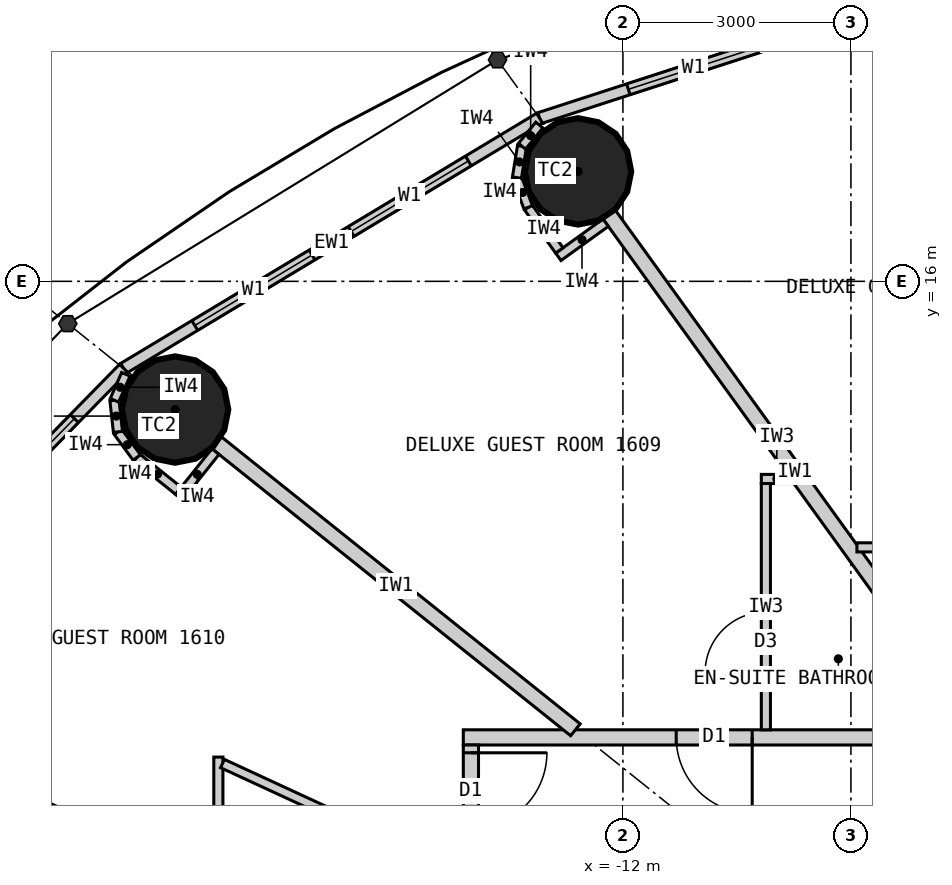
"""IFC4 building model, lengths in metres.
Left out: names, types, materials, properties, quantities, classifications, styles, units other than length and angle.
Written with IfcOpenShell. Run it as: python <this file> out.ifc"""

import sys

from ifc_helpers import new_model, si_unit, direction, frame, frame_2d, origin, origin_2d, place, context, subcontext, project, spatial, rectangle, circle, extrude, element, fill, save


model = new_model("IFC4")
c1 = context("Model", 3, precision=1e-05, world=origin(), true_north=direction((0.0, 1.0)))
c2 = subcontext(c1, "Body", "Model", "MODEL_VIEW")
j1 = project(units=[si_unit("LENGTHUNIT", "METRE"), si_unit("PLANEANGLEUNIT", "RADIAN")], contexts=[c1])
p1 = place(None, origin())
s1 = spatial("IfcSite", under=j1, at=p1, CompositionType="ELEMENT")
p2 = place(p1, origin())
s2 = spatial("IfcBuilding", under=s1, at=p2, CompositionType="ELEMENT")
p3 = place(p2, frame((0.0, 0.0, 67.2)))
s3 = spatial("IfcBuildingStorey", under=s2, at=p3, CompositionType="ELEMENT", Elevation=67.2)
for number, where, z_axis, x_axis in (
    (1, (-12.591, 17.447, 0.0), (0.0, 0.0, 1.0), (1.0, 0.0, 0.0)),
    (2, (-17.892, 14.313, 0.0), (0.0, 0.0, 1.0), (1.0, 0.0, 0.0)),
):
    element("IfcColumn", number, at=place(p3, frame(where, z_axis=z_axis, x_axis=x_axis)), inside=s3, PredefinedType="COLUMN", context=c2, shape_type="SweptSolid", body=[
        extrude(circle(Radius=0.7, at=origin_2d()), origin(), (0.0, 0.0, 1.0), 3.3),
    ])
p4 = place(p3, frame((-6.766, 20.202, 0.0), z_axis=(0.0, 0.0, 1.0), x_axis=(-0.951137534625, -0.308767534285, 0.0)))
e3 = element("IfcWall", 3, at=p4, inside=s3, PredefinedType="ELEMENTEDWALL", context=c2, shape_type="SweptSolid", body=[
    extrude(rectangle(XDim=6.655, YDim=0.15, at=frame_2d((3.328, 0.0))), origin(), (0.0, 0.0, 1.0), 3.12),
])
p5 = place(p4, frame((1.228, 0.0, 0.9)))
e4 = element("IfcOpeningElement", 4, at=p5, cuts=e3, PredefinedType="OPENING", context=c2, shape_type="SweptSolid", body=[
    extrude(rectangle(XDim=1.8, YDim=1.9, at=frame_2d((0.9, 0.95))), frame((0.0, 0.085, 0.0), z_axis=(0.0, -1.0, 0.0), x_axis=(1.0, 0.0, 0.0)), (0.0, 0.0, 1.0), 0.17),
])
p6 = place(p4, frame((3.628, 0.0, 0.9)))
e5 = element("IfcOpeningElement", 5, at=p6, cuts=e3, PredefinedType="OPENING", context=c2, shape_type="SweptSolid", body=[
    extrude(rectangle(XDim=1.8, YDim=1.9, at=frame_2d((0.9, 0.95))), frame((0.0, 0.085, 0.0), z_axis=(0.0, -1.0, 0.0), x_axis=(1.0, 0.0, 0.0)), (0.0, 0.0, 1.0), 0.17),
])
p7 = place(p3, frame((-13.096, 18.147, 0.0), z_axis=(0.0, 0.0, 1.0), x_axis=(-0.856983180864, -0.515344377787, 0.0)))
e6 = element("IfcWall", 6, at=p7, inside=s3, PredefinedType="ELEMENTEDWALL", context=c2, shape_type="SweptSolid", body=[
    extrude(rectangle(XDim=6.386, YDim=0.15, at=frame_2d((3.193, 0.0))), origin(), (0.0, 0.0, 1.0), 3.12),
])
p8 = place(p7, frame((1.093, 0.0, 0.9)))
e7 = element("IfcOpeningElement", 7, at=p8, cuts=e6, PredefinedType="OPENING", context=c2, shape_type="SweptSolid", body=[
    extrude(rectangle(XDim=1.8, YDim=1.9, at=frame_2d((0.9, 0.95))), frame((0.0, 0.085, 0.0), z_axis=(0.0, -1.0, 0.0), x_axis=(1.0, 0.0, 0.0)), (0.0, 0.0, 1.0), 0.17),
])
p9 = place(p7, frame((3.493, 0.0, 0.9)))
e8 = element("IfcOpeningElement", 8, at=p9, cuts=e6, PredefinedType="OPENING", context=c2, shape_type="SweptSolid", body=[
    extrude(rectangle(XDim=1.8, YDim=1.9, at=frame_2d((0.9, 0.95))), frame((0.0, 0.085, 0.0), z_axis=(0.0, -1.0, 0.0), x_axis=(1.0, 0.0, 0.0)), (0.0, 0.0, 1.0), 0.17),
])
p10 = place(p3, frame((-18.57, 14.856, 0.0), z_axis=(0.0, 0.0, 1.0), x_axis=(-0.699602905915, -0.714531856557, 0.0)))
e9 = element("IfcWall", 9, at=p10, inside=s3, PredefinedType="ELEMENTEDWALL", context=c2, shape_type="SweptSolid", body=[
    extrude(rectangle(XDim=6.051, YDim=0.15, at=frame_2d((3.025, 0.0))), origin(), (0.0, 0.0, 1.0), 3.12),
])
p11 = place(p10, frame((0.926, 0.0, 0.9)))
e10 = element("IfcOpeningElement", 10, at=p11, cuts=e9, PredefinedType="OPENING", context=c2, shape_type="SweptSolid", body=[
    extrude(rectangle(XDim=1.8, YDim=1.9, at=frame_2d((0.9, 0.95))), frame((0.0, 0.085, 0.0), z_axis=(0.0, -1.0, 0.0), x_axis=(1.0, 0.0, 0.0)), (0.0, 0.0, 1.0), 0.17),
])
p12 = place(p10, frame((3.325, 0.0, 0.9)))
e11 = element("IfcOpeningElement", 11, at=p12, cuts=e9, PredefinedType="OPENING", context=c2, shape_type="SweptSolid", body=[
    extrude(rectangle(XDim=1.8, YDim=1.9, at=frame_2d((0.9, 0.95))), frame((0.0, 0.085, 0.0), z_axis=(0.0, -1.0, 0.0), x_axis=(1.0, 0.0, 0.0)), (0.0, 0.0, 1.0), 0.17),
])
p13 = place(p3, frame((-14.1, 10.0, 0.0), z_axis=(0.0, 0.0, 1.0), x_axis=(1.0, 0.0, 0.0)))
e12 = element("IfcWall", 12, at=p13, inside=s3, PredefinedType="PARTITIONING", context=c2, shape_type="SweptSolid", body=[
    extrude(rectangle(XDim=28.2, YDim=0.2, at=frame_2d((14.1, 0.0))), origin(), (0.0, 0.0, 1.0), 3.12),
])
p14 = place(p13, frame((18.529, 0.0, 0.0)))
e13 = element("IfcOpeningElement", 13, at=p14, cuts=e12, PredefinedType="OPENING", context=c2, shape_type="SweptSolid", body=[
    extrude(rectangle(XDim=1.0, YDim=2.2, at=frame_2d((0.5, 1.1))), frame((0.0, 0.11, 0.0), z_axis=(0.0, -1.0, 0.0), x_axis=(1.0, 0.0, 0.0)), (0.0, 0.0, 1.0), 0.22),
])
p15 = place(p13, frame((14.623, 0.0, 0.0)))
e14 = element("IfcOpeningElement", 14, at=p15, cuts=e12, PredefinedType="OPENING", context=c2, shape_type="SweptSolid", body=[
    extrude(rectangle(XDim=1.0, YDim=2.2, at=frame_2d((0.5, 1.1))), frame((0.0, 0.11, 0.0), z_axis=(0.0, -1.0, 0.0), x_axis=(1.0, 0.0, 0.0)), (0.0, 0.0, 1.0), 0.22),
])
p16 = place(p13, frame((11.24, 0.0, 0.0)))
e15 = element("IfcOpeningElement", 15, at=p16, cuts=e12, PredefinedType="OPENING", context=c2, shape_type="SweptSolid", body=[
    extrude(rectangle(XDim=1.0, YDim=2.2, at=frame_2d((0.5, 1.1))), frame((0.0, 0.11, 0.0), z_axis=(0.0, -1.0, 0.0), x_axis=(1.0, 0.0, 0.0)), (0.0, 0.0, 1.0), 0.22),
])
p17 = place(p13, frame((8.671, 0.0, 0.0)))
e16 = element("IfcOpeningElement", 16, at=p17, cuts=e12, PredefinedType="OPENING", context=c2, shape_type="SweptSolid", body=[
    extrude(rectangle(XDim=1.0, YDim=2.2, at=frame_2d((0.5, 1.1))), frame((0.0, 0.11, 0.0), z_axis=(0.0, -1.0, 0.0), x_axis=(1.0, 0.0, 0.0)), (0.0, 0.0, 1.0), 0.22),
])
p18 = place(p13, frame((2.801, 0.0, 0.0)))
e17 = element("IfcOpeningElement", 17, at=p18, cuts=e12, PredefinedType="OPENING", context=c2, shape_type="SweptSolid", body=[
    extrude(rectangle(XDim=1.0, YDim=2.2, at=frame_2d((0.5, 1.1))), frame((0.0, 0.11, 0.0), z_axis=(0.0, -1.0, 0.0), x_axis=(1.0, 0.0, 0.0)), (0.0, 0.0, 1.0), 0.22),
])
p19 = place(p3, frame((-14.0, 9.9, 0.0), z_axis=(0.0, 0.0, 1.0), x_axis=(0.0, -1.0, 0.0)))
e18 = element("IfcWall", 18, at=p19, inside=s3, PredefinedType="PARTITIONING", context=c2, shape_type="SweptSolid", body=[
    extrude(rectangle(XDim=19.8, YDim=0.2, at=frame_2d((9.9, 0.0))), origin(), (0.0, 0.0, 1.0), 3.12),
])
p20 = place(p19, frame((0.103, 0.0, 0.0)))
e19 = element("IfcOpeningElement", 19, at=p20, cuts=e18, PredefinedType="OPENING", context=c2, shape_type="SweptSolid", body=[
    extrude(rectangle(XDim=1.0, YDim=2.2, at=frame_2d((0.5, 1.1))), frame((0.0, 0.11, 0.0), z_axis=(0.0, -1.0, 0.0), x_axis=(1.0, 0.0, 0.0)), (0.0, 0.0, 1.0), 0.22),
])
p21 = place(p19, frame((5.248, 0.0, 0.0)))
e20 = element("IfcOpeningElement", 20, at=p21, cuts=e18, PredefinedType="OPENING", context=c2, shape_type="SweptSolid", body=[
    extrude(rectangle(XDim=1.0, YDim=2.2, at=frame_2d((0.5, 1.1))), frame((0.0, 0.11, 0.0), z_axis=(0.0, -1.0, 0.0), x_axis=(1.0, 0.0, 0.0)), (0.0, 0.0, 1.0), 0.22),
])
p22 = place(p19, frame((9.438, 0.0, 0.0)))
e21 = element("IfcOpeningElement", 21, at=p22, cuts=e18, PredefinedType="OPENING", context=c2, shape_type="SweptSolid", body=[
    extrude(rectangle(XDim=1.0, YDim=2.2, at=frame_2d((0.5, 1.1))), frame((0.0, 0.11, 0.0), z_axis=(0.0, -1.0, 0.0), x_axis=(1.0, 0.0, 0.0)), (0.0, 0.0, 1.0), 0.22),
])
p23 = place(p19, frame((13.942, 0.0, 0.0)))
e22 = element("IfcOpeningElement", 22, at=p23, cuts=e18, PredefinedType="OPENING", context=c2, shape_type="SweptSolid", body=[
    extrude(rectangle(XDim=1.0, YDim=2.2, at=frame_2d((0.5, 1.1))), frame((0.0, 0.11, 0.0), z_axis=(0.0, -1.0, 0.0), x_axis=(1.0, 0.0, 0.0)), (0.0, 0.0, 1.0), 0.22),
])
p24 = place(p19, frame((18.698, 0.0, 0.0)))
e23 = element("IfcOpeningElement", 23, at=p24, cuts=e18, PredefinedType="OPENING", context=c2, shape_type="SweptSolid", body=[
    extrude(rectangle(XDim=1.0, YDim=2.2, at=frame_2d((0.5, 1.1))), frame((0.0, 0.11, 0.0), z_axis=(0.0, -1.0, 0.0), x_axis=(1.0, 0.0, 0.0)), (0.0, 0.0, 1.0), 0.22),
])
p25 = place(p3, frame((-7.289, 10.1, 0.0), z_axis=(0.0, 0.0, 1.0), x_axis=(-0.585198353053, 0.810890182197, 0.0)))
e24 = element("IfcWall", 24, at=p25, inside=s3, PredefinedType="PARTITIONING", context=c2, shape_type="SweptSolid", body=[
    extrude(rectangle(XDim=8.36, YDim=0.2, at=frame_2d((4.18, 0.0))), origin(), (0.0, 0.0, 1.0), 2.32),
])
p26 = place(p3, frame((-12.625, 10.1, 0.0), z_axis=(0.0, 0.0, 1.0), x_axis=(-0.780892451574, 0.624665493744, 0.0)))
e25 = element("IfcWall", 25, at=p26, inside=s3, PredefinedType="PARTITIONING", context=c2, shape_type="SweptSolid", body=[
    extrude(rectangle(XDim=6.045, YDim=0.2, at=frame_2d((3.022, 0.0))), origin(), (0.0, 0.0, 1.0), 2.32),
])
p27 = place(p3, frame((-14.1, 6.512, 0.0), z_axis=(0.0, 0.0, 1.0), x_axis=(-0.907832871056, 0.419332181247, 0.0)))
e26 = element("IfcWall", 26, at=p27, inside=s3, PredefinedType="PARTITIONING", context=c2, shape_type="SweptSolid", body=[
    extrude(rectangle(XDim=8.023, YDim=0.2, at=frame_2d((4.011, 0.0))), origin(), (0.0, 0.0, 1.0), 2.32),
])
p28 = place(p3, frame((-8.921, 12.5, 0.0), z_axis=(0.0, 0.0, 1.0), x_axis=(1.0, 0.0, 0.0)))
e27 = element("IfcWall", 27, at=p28, inside=s3, PredefinedType="PARTITIONING", context=c2, shape_type="SweptSolid", body=[
    extrude(rectangle(XDim=3.372, YDim=0.12, at=frame_2d((1.686, 0.0))), origin(), (0.0, 0.0, 1.0), 3.12),
])
p29 = place(p3, frame((-9.771, 13.4, 0.0), z_axis=(0.0, 0.0, 1.0), x_axis=(-1.0, 0.0, 0.0)))
e28 = element("IfcWall", 28, at=p29, inside=s3, PredefinedType="PARTITIONING", context=c2, shape_type="SweptSolid", body=[
    extrude(rectangle(XDim=0.408, YDim=0.12, at=frame_2d((0.204, 0.0))), origin(), (0.0, 0.0, 1.0), 3.12),
])
p30 = place(p3, frame((-10.119, 10.1, 0.0), z_axis=(0.0, 0.0, 1.0), x_axis=(0.0, 1.0, 0.0)))
e29 = element("IfcWall", 29, at=p30, inside=s3, PredefinedType="PARTITIONING", context=c2, shape_type="SweptSolid", body=[
    extrude(rectangle(XDim=3.24, YDim=0.12, at=frame_2d((1.62, 0.0))), origin(), (0.0, 0.0, 1.0), 3.12),
])
p31 = place(p30, frame((0.75, 0.0, 0.0)))
e30 = element("IfcOpeningElement", 30, at=p31, cuts=e29, PredefinedType="OPENING", context=c2, shape_type="SweptSolid", body=[
    extrude(rectangle(XDim=0.8, YDim=2.1, at=frame_2d((0.4, 1.05))), frame((0.0, 0.07, 0.0), z_axis=(0.0, -1.0, 0.0), x_axis=(1.0, 0.0, 0.0)), (0.0, 0.0, 1.0), 0.14),
])
p32 = place(p3, frame((-17.323, 8.101, 0.0), z_axis=(0.0, 0.0, 1.0), x_axis=(0.0, 1.0, 0.0)))
e31 = element("IfcWall", 31, at=p32, inside=s3, PredefinedType="PARTITIONING", context=c2, shape_type="SweptSolid", body=[
    extrude(rectangle(XDim=1.64, YDim=0.12, at=frame_2d((0.82, 0.0))), origin(), (0.0, 0.0, 1.0), 3.12),
])
p33 = place(p3, frame((-14.1, 8.193, 0.0), z_axis=(0.0, 0.0, 1.0), x_axis=(-0.907836493557, 0.419324338628, 0.0)))
e32 = element("IfcWall", 32, at=p33, inside=s3, PredefinedType="PARTITIONING", context=c2, shape_type="SweptSolid", body=[
    extrude(rectangle(XDim=3.49, YDim=0.12, at=frame_2d((1.745, 0.0))), origin(), (0.0, 0.0, 1.0), 3.12),
])
p34 = place(p33, frame((0.75, 0.0, 0.0)))
e33 = element("IfcOpeningElement", 33, at=p34, cuts=e32, PredefinedType="OPENING", context=c2, shape_type="SweptSolid", body=[
    extrude(rectangle(XDim=0.8, YDim=2.1, at=frame_2d((0.4, 1.05))), frame((0.0, 0.07, 0.0), z_axis=(0.0, -1.0, 0.0), x_axis=(1.0, 0.0, 0.0)), (0.0, 0.0, 1.0), 0.14),
])
p35 = place(p3, frame((-12.227, 16.772, 0.0), z_axis=(0.0, 0.0, 1.0), x_axis=(-0.810821798253, -0.585293098778, 0.0)))
e34 = element("IfcWall", 34, at=p35, inside=s3, PredefinedType="PARTITIONING", context=c2, shape_type="SweptSolid", body=[
    extrude(rectangle(XDim=0.768, YDim=0.12, at=frame_2d((0.384, 0.0))), origin(), (0.0, 0.0, 1.0), 3.12),
])
p36 = place(p3, frame((-12.836, 16.406, 0.0), z_axis=(0.0, 0.0, 1.0), x_axis=(-0.585223113993, 0.810872312296, 0.0)))
e35 = element("IfcWall", 35, at=p36, inside=s3, PredefinedType="PARTITIONING", context=c2, shape_type="SweptSolid", body=[
    extrude(rectangle(XDim=0.7, YDim=0.12, at=frame_2d((0.35, 0.0))), origin(), (0.0, 0.0, 1.0), 3.12),
])
p37 = place(p3, frame((-13.246, 16.974, 0.0), z_axis=(0.0, 0.0, 1.0), x_axis=(-0.355728122235, 0.934589483705, 0.0)))
e36 = element("IfcWall", 36, at=p37, inside=s3, PredefinedType="PARTITIONING", context=c2, shape_type="SweptSolid", body=[
    extrude(rectangle(XDim=0.418, YDim=0.12, at=frame_2d((0.209, 0.0))), origin(), (0.0, 0.0, 1.0), 3.12),
])
p38 = place(p3, frame((-13.394, 17.365, 0.0), z_axis=(0.0, 0.0, 1.0), x_axis=(0.159379276926, 0.987217425943, 0.0)))
e37 = element("IfcWall", 37, at=p38, inside=s3, PredefinedType="PARTITIONING", context=c2, shape_type="SweptSolid", body=[
    extrude(rectangle(XDim=0.418, YDim=0.12, at=frame_2d((0.209, 0.0))), origin(), (0.0, 0.0, 1.0), 3.12),
])
p39 = place(p3, frame((-13.328, 17.777, 0.0), z_axis=(0.0, 0.0, 1.0), x_axis=(0.632276783541, 0.774742582407, 0.0)))
e38 = element("IfcWall", 38, at=p39, inside=s3, PredefinedType="PARTITIONING", context=c2, shape_type="SweptSolid", body=[
    extrude(rectangle(XDim=0.36, YDim=0.12, at=frame_2d((0.18, 0.0))), origin(), (0.0, 0.0, 1.0), 3.12),
])
p40 = place(p3, frame((-17.361, 13.76, 0.0), z_axis=(0.0, 0.0, 1.0), x_axis=(-0.624501042889, -0.781023973659, 0.0)))
e39 = element("IfcWall", 39, at=p40, inside=s3, PredefinedType="PARTITIONING", context=c2, shape_type="SweptSolid", body=[
    extrude(rectangle(XDim=0.767, YDim=0.12, at=frame_2d((0.384, 0.0))), origin(), (0.0, 0.0, 1.0), 3.12),
])
p41 = place(p3, frame((-17.85, 13.246, 0.0), z_axis=(0.0, 0.0, 1.0), x_axis=(-0.780902834923, 0.62465251333, 0.0)))
e40 = element("IfcWall", 40, at=p41, inside=s3, PredefinedType="PARTITIONING", context=c2, shape_type="SweptSolid", body=[
    extrude(rectangle(XDim=0.7, YDim=0.12, at=frame_2d((0.35, 0.0))), origin(), (0.0, 0.0, 1.0), 3.12),
])
for number, where, z_axis, x_axis in (
    (41, (-18.396, 13.683, 0.0), (0.0, 0.0, 1.0), (-0.592, 0.806, 0.0)),
    (42, (-18.644, 14.02, 0.0), (0.0, 0.0, 1.0), (-0.11, 0.994, 0.0)),
):
    element("IfcWall", number, at=place(p3, frame(where, z_axis=z_axis, x_axis=x_axis)), inside=s3, PredefinedType="PARTITIONING", context=c2, shape_type="SweptSolid", body=[
        extrude(rectangle(XDim=0.418, YDim=0.12, at=frame_2d((0.209, 0.0))), origin(), (0.0, 0.0, 1.0), 3.12),
    ])
p42 = place(p3, frame((-18.69, 14.435, 0.0), z_axis=(0.0, 0.0, 1.0), x_axis=(0.401093412634, 0.91603715773, 0.0)))
e43 = element("IfcWall", 43, at=p42, inside=s3, PredefinedType="PARTITIONING", context=c2, shape_type="SweptSolid", body=[
    extrude(rectangle(XDim=0.373, YDim=0.12, at=frame_2d((0.187, 0.0))), origin(), (0.0, 0.0, 1.0), 3.12),
])
p43 = place(p6, origin())
e44 = element("IfcWindow", 44, at=p43, inside=s3, PartitioningType="SINGLE_PANEL", PredefinedType="WINDOW", context=c2, shape_type="SweptSolid", body=[
    extrude(rectangle(XDim=1.8, YDim=1.9, at=frame_2d((0.9, 0.95))), frame((0.0, 0.03, 0.0), z_axis=(0.0, -1.0, 0.0), x_axis=(1.0, 0.0, 0.0)), (0.0, 0.0, 1.0), 0.06),
])
fill(e5, e44)
p44 = place(p8, origin())
e45 = element("IfcWindow", 45, at=p44, inside=s3, PartitioningType="SINGLE_PANEL", PredefinedType="WINDOW", context=c2, shape_type="SweptSolid", body=[
    extrude(rectangle(XDim=1.8, YDim=1.9, at=frame_2d((0.9, 0.95))), frame((0.0, 0.03, 0.0), z_axis=(0.0, -1.0, 0.0), x_axis=(1.0, 0.0, 0.0)), (0.0, 0.0, 1.0), 0.06),
])
fill(e7, e45)
p45 = place(p9, origin())
e46 = element("IfcWindow", 46, at=p45, inside=s3, PartitioningType="SINGLE_PANEL", PredefinedType="WINDOW", context=c2, shape_type="SweptSolid", body=[
    extrude(rectangle(XDim=1.8, YDim=1.9, at=frame_2d((0.9, 0.95))), frame((0.0, 0.03, 0.0), z_axis=(0.0, -1.0, 0.0), x_axis=(1.0, 0.0, 0.0)), (0.0, 0.0, 1.0), 0.06),
])
fill(e8, e46)
p46 = place(p11, origin())
e47 = element("IfcWindow", 47, at=p46, inside=s3, PartitioningType="SINGLE_PANEL", PredefinedType="WINDOW", context=c2, shape_type="SweptSolid", body=[
    extrude(rectangle(XDim=1.8, YDim=1.9, at=frame_2d((0.9, 0.95))), frame((0.0, 0.03, 0.0), z_axis=(0.0, -1.0, 0.0), x_axis=(1.0, 0.0, 0.0)), (0.0, 0.0, 1.0), 0.06),
])
fill(e10, e47)
p47 = place(p31, origin())
e48 = element("IfcDoor", 48, at=p47, inside=s3, OperationType="SINGLE_SWING_LEFT", PredefinedType="DOOR", context=c2, shape_type="SweptSolid", body=[
    extrude(rectangle(XDim=0.8, YDim=2.1, at=frame_2d((0.4, 1.05))), frame((0.0, 0.025, 0.0), z_axis=(0.0, -1.0, 0.0), x_axis=(1.0, 0.0, 0.0)), (0.0, 0.0, 1.0), 0.05),
])
fill(e30, e48)
p48 = place(p18, origin())
e49 = element("IfcDoor", 49, at=p48, inside=s3, OperationType="SINGLE_SWING_RIGHT", PredefinedType="DOOR", context=c2, shape_type="SweptSolid", body=[
    extrude(rectangle(XDim=1.0, YDim=2.2, at=frame_2d((0.5, 1.1))), frame((0.0, 0.025, 0.0), z_axis=(0.0, -1.0, 0.0), x_axis=(1.0, 0.0, 0.0)), (0.0, 0.0, 1.0), 0.05),
])
fill(e17, e49)
p49 = place(p20, origin())
e50 = element("IfcDoor", 50, at=p49, inside=s3, OperationType="SINGLE_SWING_LEFT", PredefinedType="DOOR", context=c2, shape_type="SweptSolid", body=[
    extrude(rectangle(XDim=1.0, YDim=2.2, at=frame_2d((0.5, 1.1))), frame((0.0, 0.025, 0.0), z_axis=(0.0, -1.0, 0.0), x_axis=(1.0, 0.0, 0.0)), (0.0, 0.0, 1.0), 0.05),
])
fill(e19, e50)
save(model, sys.argv[1])
